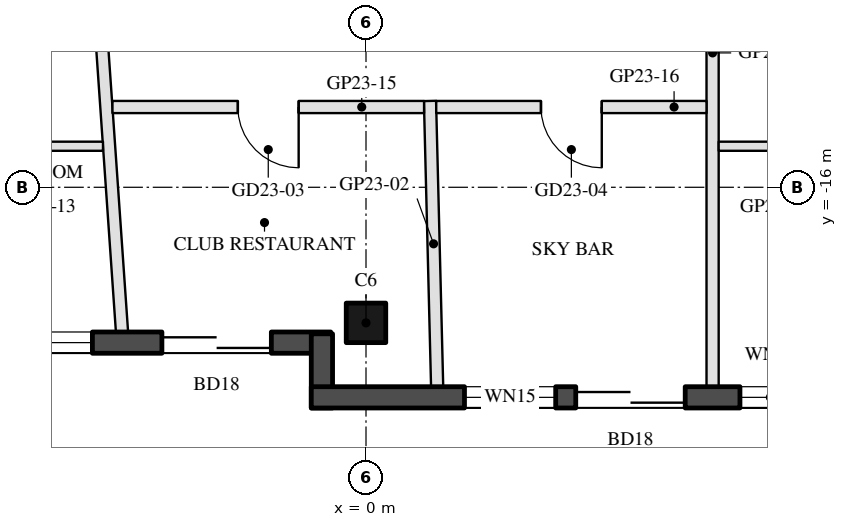
"""IFC4 building model, lengths in metres.
Left out: names, types, materials, properties, quantities, classifications, styles, units other than length and angle.
Written with IfcOpenShell. Run it as: python <this file> out.ifc"""

import sys

from ifc_helpers import new_model, si_unit, direction, frame, frame_2d, origin, origin_2d, place, context, subcontext, project, spatial, rectangle, hollow_rectangle, extrude, element, fill, save


model = new_model("IFC4")
c1 = context("Model", 3, precision=1e-05, world=origin(), true_north=direction((0.0, 1.0)))
c2 = subcontext(c1, "Body", "Model", "MODEL_VIEW")
j1 = project(units=[si_unit("LENGTHUNIT", "METRE"), si_unit("PLANEANGLEUNIT", "RADIAN")], contexts=[c1])
p1 = place(None, origin())
s1 = spatial("IfcSite", under=j1, at=p1, CompositionType="ELEMENT")
p2 = place(p1, origin())
s2 = spatial("IfcBuilding", under=s1, at=p2, CompositionType="ELEMENT")
p3 = place(p2, frame((0.0, 0.0, 246.7)))
s3 = spatial("IfcBuildingStorey", under=s2, at=p3, CompositionType="ELEMENT", Elevation=246.7)
p4 = place(p3, frame((0.0, -18.23, 0.0), z_axis=(0.0, 0.0, 1.0), x_axis=(-1.0, 0.0, 0.0)))
e1 = element("IfcColumn", 1, at=p4, inside=s3, PredefinedType="COLUMN", context=c2, shape_type="SweptSolid", body=[
    extrude(hollow_rectangle(XDim=0.65, YDim=0.65, WallThickness=0.03, at=origin_2d()), origin(), (0.0, 0.0, 1.0), 3.7),
])
p5 = place(p3, frame((-7.32, -18.555, 0.0), z_axis=(0.0, 0.0, 1.0), x_axis=(1.0, 0.0, 0.0)))
e2 = element("IfcWall", 2, at=p5, inside=s3, PredefinedType="SOLIDWALL", context=c2, shape_type="SweptSolid", body=[
    extrude(rectangle(XDim=6.74, YDim=0.35, at=frame_2d((3.37, 0.0))), origin(), (0.0, 0.0, 1.0), 3.55),
])
p6 = place(p5, frame((0.32, 0.0, 0.3)))
e3 = element("IfcOpeningElement", 3, at=p6, cuts=e2, PredefinedType="OPENING", context=c2, shape_type="SweptSolid", body=[
    extrude(rectangle(XDim=2.5, YDim=2.65, at=frame_2d((1.25, 1.325))), frame((0.0, 0.185, 0.0), z_axis=(0.0, -1.0, 0.0), x_axis=(1.0, 0.0, 0.0)), (0.0, 0.0, 1.0), 0.37),
])
p7 = place(p5, frame((3.963, 0.0, 0.0)))
e4 = element("IfcOpeningElement", 4, at=p7, cuts=e2, PredefinedType="OPENING", context=c2, shape_type="SweptSolid", body=[
    extrude(rectangle(XDim=1.8, YDim=2.4, at=frame_2d((0.9, 1.2))), frame((0.0, 0.185, 0.0), z_axis=(0.0, -1.0, 0.0), x_axis=(1.0, 0.0, 0.0)), (0.0, 0.0, 1.0), 0.37),
])
p8 = place(p3, frame((-0.725, -18.41, 0.0), z_axis=(0.0, 0.0, 1.0), x_axis=(0.0, -1.0, 0.0)))
e5 = element("IfcWall", 5, at=p8, inside=s3, PredefinedType="SOLIDWALL", context=c2, shape_type="SweptSolid", body=[
    extrude(rectangle(XDim=1.22, YDim=0.35, at=frame_2d((0.61, 0.0))), origin(), (0.0, 0.0, 1.0), 3.55),
])
p9 = place(p3, frame((-0.9, -19.455, 0.0), z_axis=(0.0, 0.0, 1.0), x_axis=(1.0, 0.0, 0.0)))
e6 = element("IfcWall", 6, at=p9, inside=s3, PredefinedType="SOLIDWALL", context=c2, shape_type="SweptSolid", body=[
    extrude(rectangle(XDim=9.7, YDim=0.35, at=frame_2d((4.85, 0.0))), origin(), (0.0, 0.0, 1.0), 3.55),
])
p10 = place(p9, frame((4.35, 0.0, 0.0)))
e7 = element("IfcOpeningElement", 7, at=p10, cuts=e6, PredefinedType="OPENING", context=c2, shape_type="SweptSolid", body=[
    extrude(rectangle(XDim=1.8, YDim=2.4, at=frame_2d((0.9, 1.2))), frame((0.0, 0.185, 0.0), z_axis=(0.0, -1.0, 0.0), x_axis=(1.0, 0.0, 0.0)), (0.0, 0.0, 1.0), 0.37),
])
p11 = place(p9, frame((2.52, 0.0, 0.3)))
e8 = element("IfcOpeningElement", 8, at=p11, cuts=e6, PredefinedType="OPENING", context=c2, shape_type="SweptSolid", body=[
    extrude(rectangle(XDim=1.5, YDim=2.65, at=frame_2d((0.75, 1.325))), frame((0.0, 0.185, 0.0), z_axis=(0.0, -1.0, 0.0), x_axis=(1.0, 0.0, 0.0)), (0.0, 0.0, 1.0), 0.37),
])
p12 = place(p9, frame((7.05, 0.0, 0.3)))
e9 = element("IfcOpeningElement", 9, at=p12, cuts=e6, PredefinedType="OPENING", context=c2, shape_type="SweptSolid", body=[
    extrude(rectangle(XDim=1.0, YDim=2.65, at=frame_2d((0.5, 1.325))), frame((0.0, 0.185, 0.0), z_axis=(0.0, -1.0, 0.0), x_axis=(1.0, 0.0, 0.0)), (0.0, 0.0, 1.0), 0.37),
])
p13 = place(p3, frame((-4.013, -18.38, 0.0), z_axis=(0.0, 0.0, 1.0), x_axis=(-0.06939415619, 0.997589319854, 0.0)))
e10 = element("IfcWall", 10, at=p13, inside=s3, PredefinedType="PARTITIONING", context=c2, shape_type="SweptSolid", body=[
    extrude(rectangle(XDim=10.104, YDim=0.2, at=frame_2d((5.052, 0.0))), origin(), (0.0, 0.0, 1.0), 2.95),
])
p14 = place(p3, frame((1.17, -19.28, 0.0), z_axis=(0.0, 0.0, 1.0), x_axis=(-0.025029816209, 0.999686705073, 0.0)))
e11 = element("IfcWall", 11, at=p14, inside=s3, PredefinedType="PARTITIONING", context=c2, shape_type="SweptSolid", body=[
    extrude(rectangle(XDim=4.701, YDim=0.2, at=frame_2d((2.351, 0.0))), origin(), (0.0, 0.0, 1.0), 3.16),
])
p15 = place(p3, frame((5.7, -19.28, 0.0), z_axis=(0.0, 0.0, 1.0), x_axis=(0.0, 1.0, 0.0)))
e12 = element("IfcWall", 12, at=p15, inside=s3, PredefinedType="PARTITIONING", context=c2, shape_type="SweptSolid", body=[
    extrude(rectangle(XDim=10.98, YDim=0.2, at=frame_2d((5.49, 0.0))), origin(), (0.0, 0.0, 1.0), 3.16),
])
p16 = place(p3, frame((-6.365, -15.325, 0.0), z_axis=(0.0, 0.0, 1.0), x_axis=(1.0, 0.0, 0.0)))
e13 = element("IfcWall", 13, at=p16, inside=s3, PredefinedType="PARTITIONING", context=c2, shape_type="SweptSolid", body=[
    extrude(rectangle(XDim=2.04, YDim=0.15, at=frame_2d((1.02, 0.0))), origin(), (0.0, 0.0, 1.0), 3.55),
])
p17 = place(p3, frame((0.955, -14.68, 0.0), z_axis=(0.0, 0.0, 1.0), x_axis=(-1.0, 0.0, 0.0)))
e14 = element("IfcWall", 14, at=p17, inside=s3, PredefinedType="PARTITIONING", context=c2, shape_type="SweptSolid", body=[
    extrude(rectangle(XDim=5.125, YDim=0.2, at=frame_2d((2.562, 0.0))), origin(), (0.0, 0.0, 1.0), 2.95),
])
p18 = place(p17, frame((2.062, 0.0, 0.0)))
e15 = element("IfcOpeningElement", 15, at=p18, cuts=e14, PredefinedType="OPENING", context=c2, shape_type="SweptSolid", body=[
    extrude(rectangle(XDim=1.0, YDim=2.1, at=frame_2d((0.5, 1.05))), frame((0.0, 0.11, 0.0), z_axis=(0.0, -1.0, 0.0), x_axis=(1.0, 0.0, 0.0)), (0.0, 0.0, 1.0), 0.22),
])
p19 = place(p3, frame((5.6, -14.68, 0.0), z_axis=(0.0, 0.0, 1.0), x_axis=(-1.0, 0.0, 0.0)))
e16 = element("IfcWall", 16, at=p19, inside=s3, PredefinedType="PARTITIONING", context=c2, shape_type="SweptSolid", body=[
    extrude(rectangle(XDim=4.445, YDim=0.2, at=frame_2d((2.223, 0.0))), origin(), (0.0, 0.0, 1.0), 2.95),
])
p20 = place(p19, frame((1.723, 0.0, 0.0)))
e17 = element("IfcOpeningElement", 17, at=p20, cuts=e16, PredefinedType="OPENING", context=c2, shape_type="SweptSolid", body=[
    extrude(rectangle(XDim=1.0, YDim=2.1, at=frame_2d((0.5, 1.05))), frame((0.0, 0.11, 0.0), z_axis=(0.0, -1.0, 0.0), x_axis=(1.0, 0.0, 0.0)), (0.0, 0.0, 1.0), 0.22),
])
p21 = place(p3, frame((5.8, -15.325, 0.0), z_axis=(0.0, 0.0, 1.0), x_axis=(1.0, 0.0, 0.0)))
e18 = element("IfcWall", 18, at=p21, inside=s3, PredefinedType="PARTITIONING", context=c2, shape_type="SweptSolid", body=[
    extrude(rectangle(XDim=1.85, YDim=0.15, at=frame_2d((0.925, 0.0))), origin(), (0.0, 0.0, 1.0), 3.55),
])
p22 = place(p6, origin())
e19 = element("IfcWindow", 19, at=p22, inside=s3, PartitioningType="SINGLE_PANEL", PredefinedType="WINDOW", context=c2, shape_type="SweptSolid", body=[
    extrude(rectangle(XDim=2.5, YDim=2.65, at=frame_2d((1.25, 1.325))), frame((0.0, 0.03, 0.0), z_axis=(0.0, -1.0, 0.0), x_axis=(1.0, 0.0, 0.0)), (0.0, 0.0, 1.0), 0.06),
])
fill(e3, e19)
p23 = place(p7, frame((1.8, 0.0, 0.0), z_axis=(0.0, 0.0, 1.0), x_axis=(-1.0, 0.0, 0.0)))
e20 = element("IfcDoor", 20, at=p23, inside=s3, OperationType="SLIDING_TO_LEFT", PredefinedType="DOOR", context=c2, shape_type="SweptSolid", body=[
    extrude(rectangle(XDim=1.8, YDim=2.4, at=frame_2d((0.9, 1.2))), frame((0.0, 0.025, 0.0), z_axis=(0.0, -1.0, 0.0), x_axis=(1.0, 0.0, 0.0)), (0.0, 0.0, 1.0), 0.05),
])
fill(e4, e20)
p24 = place(p10, frame((1.8, 0.0, 0.0), z_axis=(0.0, 0.0, 1.0), x_axis=(-1.0, 0.0, 0.0)))
e21 = element("IfcDoor", 21, at=p24, inside=s3, OperationType="SLIDING_TO_LEFT", PredefinedType="DOOR", context=c2, shape_type="SweptSolid", body=[
    extrude(rectangle(XDim=1.8, YDim=2.4, at=frame_2d((0.9, 1.2))), frame((0.0, 0.025, 0.0), z_axis=(0.0, -1.0, 0.0), x_axis=(1.0, 0.0, 0.0)), (0.0, 0.0, 1.0), 0.05),
])
fill(e7, e21)
p25 = place(p11, origin())
e22 = element("IfcWindow", 22, at=p25, inside=s3, PartitioningType="SINGLE_PANEL", PredefinedType="WINDOW", context=c2, shape_type="SweptSolid", body=[
    extrude(rectangle(XDim=1.5, YDim=2.65, at=frame_2d((0.75, 1.325))), frame((0.0, 0.03, 0.0), z_axis=(0.0, -1.0, 0.0), x_axis=(1.0, 0.0, 0.0)), (0.0, 0.0, 1.0), 0.06),
])
fill(e8, e22)
p26 = place(p12, origin())
e23 = element("IfcWindow", 23, at=p26, inside=s3, PartitioningType="SINGLE_PANEL", PredefinedType="WINDOW", context=c2, shape_type="SweptSolid", body=[
    extrude(rectangle(XDim=1.0, YDim=2.65, at=frame_2d((0.5, 1.325))), frame((0.0, 0.03, 0.0), z_axis=(0.0, -1.0, 0.0), x_axis=(1.0, 0.0, 0.0)), (0.0, 0.0, 1.0), 0.06),
])
fill(e9, e23)
p27 = place(p18, origin())
e24 = element("IfcDoor", 24, at=p27, inside=s3, OperationType="SINGLE_SWING_LEFT", PredefinedType="DOOR", context=c2, shape_type="SweptSolid", body=[
    extrude(rectangle(XDim=1.0, YDim=2.1, at=frame_2d((0.5, 1.05))), frame((0.0, 0.025, 0.0), z_axis=(0.0, -1.0, 0.0), x_axis=(1.0, 0.0, 0.0)), (0.0, 0.0, 1.0), 0.05),
])
fill(e15, e24)
p28 = place(p20, origin())
e25 = element("IfcDoor", 25, at=p28, inside=s3, OperationType="SINGLE_SWING_LEFT", PredefinedType="DOOR", context=c2, shape_type="SweptSolid", body=[
    extrude(rectangle(XDim=1.0, YDim=2.1, at=frame_2d((0.5, 1.05))), frame((0.0, 0.025, 0.0), z_axis=(0.0, -1.0, 0.0), x_axis=(1.0, 0.0, 0.0)), (0.0, 0.0, 1.0), 0.05),
])
fill(e17, e25)
save(model, sys.argv[1])
